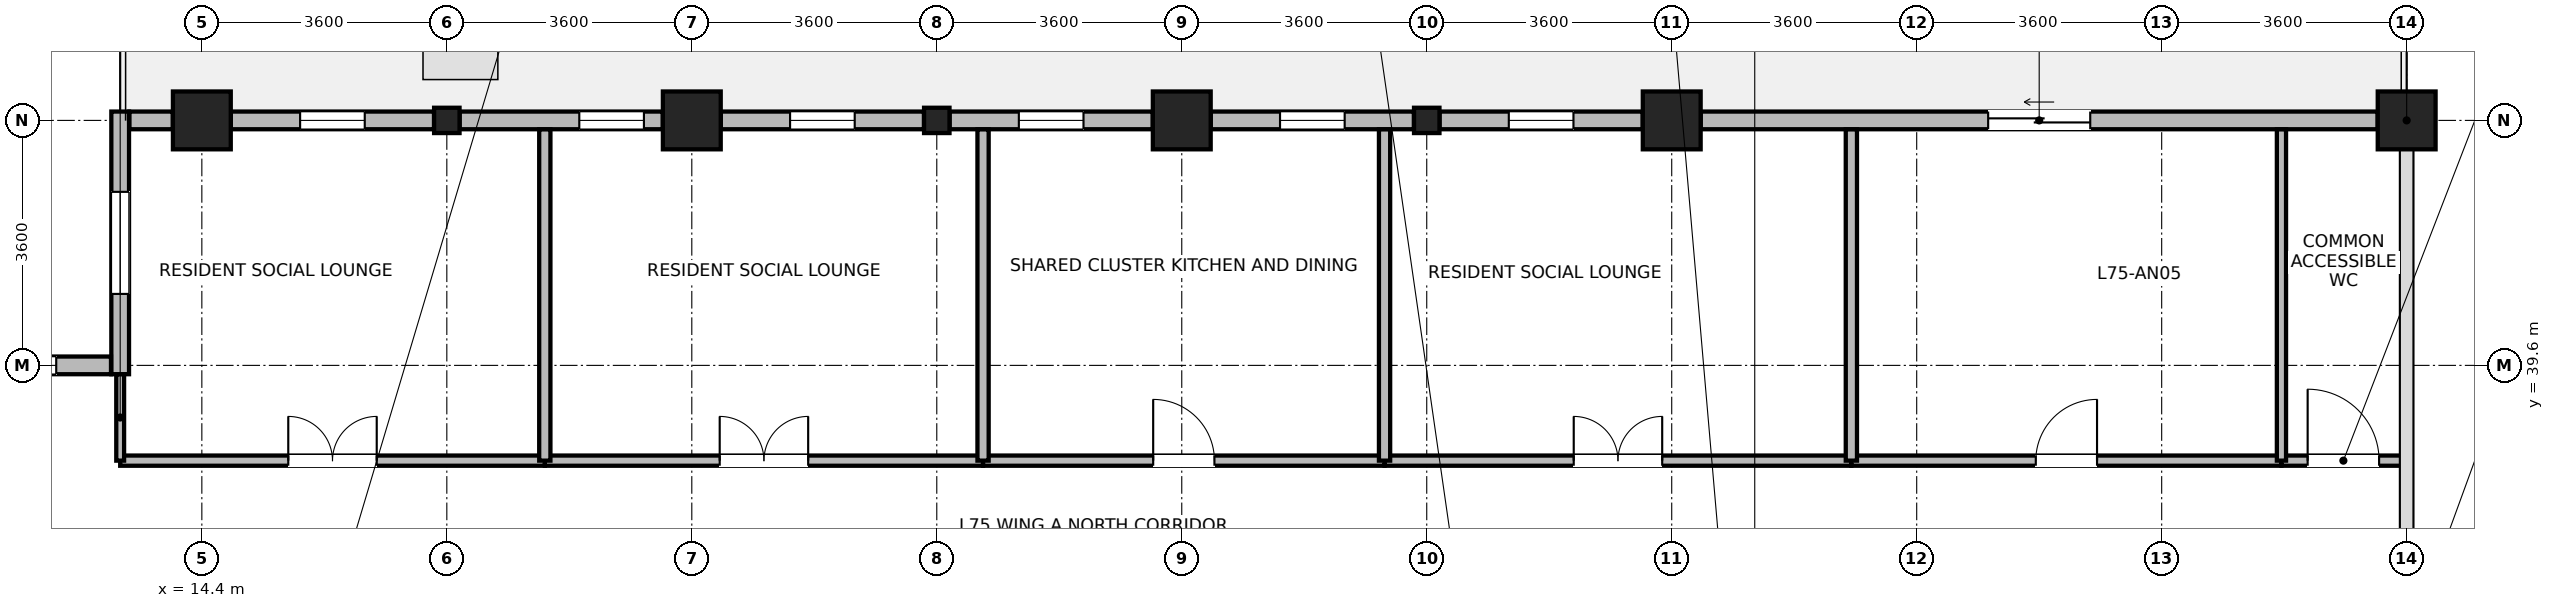
"""IFC4 building model, lengths in metres.
Left out: names, types, materials, properties, quantities, classifications, styles, units other than length and angle.
Written with IfcOpenShell. Run it as: python <this file> out.ifc"""

import sys

from ifc_helpers import new_model, si_unit, direction, frame, frame_2d, origin, origin_2d, place, context, subcontext, project, spatial, rectangle, i_section, extrude, source, transform, mapped, element, fill, save


model = new_model("IFC4")
c1 = context("Model", 3, precision=1e-05, world=origin(), true_north=direction((0.0, 1.0)))
c2 = subcontext(c1, "Body", "Model", "MODEL_VIEW")
j1 = project(units=[si_unit("LENGTHUNIT", "METRE"), si_unit("PLANEANGLEUNIT", "RADIAN")], contexts=[c1])
p1 = place(None, origin())
s1 = spatial("IfcSite", under=j1, at=p1, CompositionType="ELEMENT")
p2 = place(p1, origin())
s2 = spatial("IfcBuilding", under=s1, at=p2, CompositionType="ELEMENT")
p3 = place(p2, frame((0.0, 0.0, 290.6)))
s3 = spatial("IfcBuildingStorey", under=s2, at=p3, CompositionType="ELEMENT", Elevation=290.6)
m1 = source(origin(), c2, "Body", "SweptSolid", [
    extrude(rectangle(XDim=0.85, YDim=0.85, at=origin_2d()), origin(), (0.0, 0.0, 1.0), 3.7),
])
for number, where, z_axis, x_axis in (
    (1, (14.4, 43.2, 0.0), (0.0, 0.0, 1.0), (1.0, 0.0, 0.0)),
    (2, (21.6, 43.2, 0.0), (0.0, 0.0, 1.0), (1.0, 0.0, 0.0)),
    (3, (28.8, 43.2, 0.0), (0.0, 0.0, 1.0), (1.0, 0.0, 0.0)),
    (4, (36.0, 43.2, 0.0), (0.0, 0.0, 1.0), (1.0, 0.0, 0.0)),
    (5, (46.8, 43.2, 0.0), (0.0, 0.0, 1.0), (1.0, 0.0, 0.0)),
):
    element("IfcColumn", number, at=place(p3, frame(where, z_axis=z_axis, x_axis=x_axis)), inside=s3, PredefinedType="COLUMN", context=c2, shape_type="MappedRepresentation", body=[
        mapped(m1, transform((0.0, 0.0, 0.0), x_axis=(1.0, 0.0, 0.0), y_axis=(0.0, 1.0, 0.0), z_axis=(0.0, 0.0, 1.0), scale=1.0)),
    ])
m2 = source(origin(), c2, "Body", "SweptSolid", [
    extrude(i_section(OverallWidth=0.374, OverallDepth=0.372, WebThickness=0.015, FlangeThickness=0.026, FilletRadius=0.015, at=origin_2d()), origin(), (0.0, 0.0, 1.0), 3.7),
])
for number, where, z_axis, x_axis in (
    (6, (18.0, 43.2, 0.0), (0.0, 0.0, 1.0), (1.0, 0.0, 0.0)),
    (7, (25.2, 43.2, 0.0), (0.0, 0.0, 1.0), (1.0, 0.0, 0.0)),
    (8, (32.4, 43.2, 0.0), (0.0, 0.0, 1.0), (1.0, 0.0, 0.0)),
):
    element("IfcColumn", number, at=place(p3, frame(where, z_axis=z_axis, x_axis=x_axis)), inside=s3, PredefinedType="COLUMN", context=c2, shape_type="MappedRepresentation", body=[
        mapped(m2, transform((0.0, 0.0, 0.0), x_axis=(1.0, 0.0, 0.0), y_axis=(0.0, 1.0, 0.0), z_axis=(0.0, 0.0, 1.0), scale=1.0)),
    ])
p4 = place(p3, frame((36.426, 43.2, 0.0), z_axis=(0.0, 0.0, 1.0), x_axis=(1.0, 0.0, 0.0)))
e9 = element("IfcWall", 9, at=p4, inside=s3, PredefinedType="STANDARD", context=c2, shape_type="SweptSolid", body=[
    extrude(rectangle(XDim=9.948, YDim=0.26, at=frame_2d((4.974, 0.0))), origin(), (0.0, 0.0, 1.0), 3.055),
])
p5 = place(p4, frame((4.224, 0.0, 0.0)))
e10 = element("IfcOpeningElement", 10, at=p5, cuts=e9, PredefinedType="OPENING", context=c2, shape_type="SweptSolid", body=[
    extrude(rectangle(XDim=1.5, YDim=2.15, at=frame_2d((0.75, 1.075))), frame((0.0, 0.14, 0.0), z_axis=(0.0, -1.0, 0.0), x_axis=(1.0, 0.0, 0.0)), (0.0, 0.0, 1.0), 0.28),
])
p6 = place(p3, frame((32.588, 43.2, 0.0), z_axis=(0.0, 0.0, 1.0), x_axis=(1.0, 0.0, 0.0)))
e11 = element("IfcWall", 11, at=p6, inside=s3, PredefinedType="STANDARD", context=c2, shape_type="SweptSolid", body=[
    extrude(rectangle(XDim=2.986, YDim=0.26, at=frame_2d((1.493, 0.0))), origin(), (0.0, 0.0, 1.0), 3.055),
])
p7 = place(p6, frame((1.018, 0.0, 0.85)))
e12 = element("IfcOpeningElement", 12, at=p7, cuts=e11, PredefinedType="OPENING", context=c2, shape_type="SweptSolid", body=[
    extrude(rectangle(XDim=0.95, YDim=1.75, at=frame_2d((0.475, 0.875))), frame((0.0, 0.14, 0.0), z_axis=(0.0, -1.0, 0.0), x_axis=(1.0, 0.0, 0.0)), (0.0, 0.0, 1.0), 0.28),
])
p8 = place(p3, frame((29.226, 43.2, 0.0), z_axis=(0.0, 0.0, 1.0), x_axis=(1.0, 0.0, 0.0)))
e13 = element("IfcWall", 13, at=p8, inside=s3, PredefinedType="STANDARD", context=c2, shape_type="SweptSolid", body=[
    extrude(rectangle(XDim=2.986, YDim=0.26, at=frame_2d((1.493, 0.0))), origin(), (0.0, 0.0, 1.0), 3.055),
])
p9 = place(p8, frame((1.018, 0.0, 0.85)))
e14 = element("IfcOpeningElement", 14, at=p9, cuts=e13, PredefinedType="OPENING", context=c2, shape_type="SweptSolid", body=[
    extrude(rectangle(XDim=0.95, YDim=1.75, at=frame_2d((0.475, 0.875))), frame((0.0, 0.14, 0.0), z_axis=(0.0, -1.0, 0.0), x_axis=(1.0, 0.0, 0.0)), (0.0, 0.0, 1.0), 0.28),
])
p10 = place(p3, frame((25.388, 43.2, 0.0), z_axis=(0.0, 0.0, 1.0), x_axis=(1.0, 0.0, 0.0)))
e15 = element("IfcWall", 15, at=p10, inside=s3, PredefinedType="STANDARD", context=c2, shape_type="SweptSolid", body=[
    extrude(rectangle(XDim=2.986, YDim=0.26, at=frame_2d((1.493, 0.0))), origin(), (0.0, 0.0, 1.0), 3.055),
])
p11 = place(p10, frame((1.018, 0.0, 0.85)))
e16 = element("IfcOpeningElement", 16, at=p11, cuts=e15, PredefinedType="OPENING", context=c2, shape_type="SweptSolid", body=[
    extrude(rectangle(XDim=0.95, YDim=1.75, at=frame_2d((0.475, 0.875))), frame((0.0, 0.14, 0.0), z_axis=(0.0, -1.0, 0.0), x_axis=(1.0, 0.0, 0.0)), (0.0, 0.0, 1.0), 0.28),
])
p12 = place(p3, frame((22.026, 43.2, 0.0), z_axis=(0.0, 0.0, 1.0), x_axis=(1.0, 0.0, 0.0)))
e17 = element("IfcWall", 17, at=p12, inside=s3, PredefinedType="STANDARD", context=c2, shape_type="SweptSolid", body=[
    extrude(rectangle(XDim=2.986, YDim=0.26, at=frame_2d((1.493, 0.0))), origin(), (0.0, 0.0, 1.0), 3.055),
])
p13 = place(p12, frame((1.018, 0.0, 0.85)))
e18 = element("IfcOpeningElement", 18, at=p13, cuts=e17, PredefinedType="OPENING", context=c2, shape_type="SweptSolid", body=[
    extrude(rectangle(XDim=0.95, YDim=1.75, at=frame_2d((0.475, 0.875))), frame((0.0, 0.14, 0.0), z_axis=(0.0, -1.0, 0.0), x_axis=(1.0, 0.0, 0.0)), (0.0, 0.0, 1.0), 0.28),
])
p14 = place(p3, frame((18.188, 43.2, 0.0), z_axis=(0.0, 0.0, 1.0), x_axis=(1.0, 0.0, 0.0)))
e19 = element("IfcWall", 19, at=p14, inside=s3, PredefinedType="STANDARD", context=c2, shape_type="SweptSolid", body=[
    extrude(rectangle(XDim=2.986, YDim=0.26, at=frame_2d((1.493, 0.0))), origin(), (0.0, 0.0, 1.0), 3.055),
])
p15 = place(p14, frame((1.759, 0.0, 0.85)))
e20 = element("IfcOpeningElement", 20, at=p15, cuts=e19, PredefinedType="OPENING", context=c2, shape_type="SweptSolid", body=[
    extrude(rectangle(XDim=0.95, YDim=1.75, at=frame_2d((0.475, 0.875))), frame((0.0, 0.14, 0.0), z_axis=(0.0, -1.0, 0.0), x_axis=(1.0, 0.0, 0.0)), (0.0, 0.0, 1.0), 0.28),
])
p16 = place(p3, frame((14.826, 43.2, 0.0), z_axis=(0.0, 0.0, 1.0), x_axis=(1.0, 0.0, 0.0)))
e21 = element("IfcWall", 21, at=p16, inside=s3, PredefinedType="STANDARD", context=c2, shape_type="SweptSolid", body=[
    extrude(rectangle(XDim=2.986, YDim=0.26, at=frame_2d((1.493, 0.0))), origin(), (0.0, 0.0, 1.0), 3.055),
])
p17 = place(p16, frame((1.018, 0.0, 0.85)))
e22 = element("IfcOpeningElement", 22, at=p17, cuts=e21, PredefinedType="OPENING", context=c2, shape_type="SweptSolid", body=[
    extrude(rectangle(XDim=0.95, YDim=1.75, at=frame_2d((0.475, 0.875))), frame((0.0, 0.14, 0.0), z_axis=(0.0, -1.0, 0.0), x_axis=(1.0, 0.0, 0.0)), (0.0, 0.0, 1.0), 0.28),
])
p18 = place(p3, frame((13.335, 43.2, 0.0), z_axis=(0.0, 0.0, 1.0), x_axis=(1.0, 0.0, 0.0)))
e23 = element("IfcWall", 23, at=p18, inside=s3, PredefinedType="STANDARD", context=c2, shape_type="SweptSolid", body=[
    extrude(rectangle(XDim=0.639, YDim=0.26, at=frame_2d((0.32, 0.0))), origin(), (0.0, 0.0, 1.0), 3.455),
])
p19 = place(p3, frame((13.2, 39.47, 0.0), z_axis=(0.0, 0.0, 1.0), x_axis=(0.0, 1.0, 0.0)))
e24 = element("IfcWall", 24, at=p19, inside=s3, PredefinedType="STANDARD", context=c2, shape_type="SweptSolid", body=[
    extrude(rectangle(XDim=3.86, YDim=0.26, at=frame_2d((1.93, 0.0))), origin(), (0.0, 0.0, 1.0), 3.455),
])
p20 = place(p19, frame((1.18, 0.0, 0.85)))
e25 = element("IfcOpeningElement", 25, at=p20, cuts=e24, PredefinedType="OPENING", context=c2, shape_type="SweptSolid", body=[
    extrude(rectangle(XDim=1.5, YDim=1.85, at=frame_2d((0.75, 0.925))), frame((0.0, 0.14, 0.0), z_axis=(0.0, -1.0, 0.0), x_axis=(1.0, 0.0, 0.0)), (0.0, 0.0, 1.0), 0.28),
])
p21 = place(p3, frame((3.735, 39.6, 0.0), z_axis=(0.0, 0.0, 1.0), x_axis=(1.0, 0.0, 0.0)))
e26 = element("IfcWall", 26, at=p21, inside=s3, PredefinedType="STANDARD", context=c2, shape_type="SweptSolid", body=[
    extrude(rectangle(XDim=9.33, YDim=0.26, at=frame_2d((4.665, 0.0))), origin(), (0.0, 0.0, 1.0), 3.455),
])
p22 = place(p21, frame((0.805, 0.0, 0.85)))
e27 = element("IfcOpeningElement", 27, at=p22, cuts=e26, PredefinedType="OPENING", context=c2, shape_type="SweptSolid", body=[
    extrude(rectangle(XDim=1.5, YDim=1.85, at=frame_2d((0.75, 0.925))), frame((0.0, 0.14, 0.0), z_axis=(0.0, -1.0, 0.0), x_axis=(1.0, 0.0, 0.0)), (0.0, 0.0, 1.0), 0.28),
])
p23 = place(p21, frame((3.915, 0.0, 0.85)))
e28 = element("IfcOpeningElement", 28, at=p23, cuts=e26, PredefinedType="OPENING", context=c2, shape_type="SweptSolid", body=[
    extrude(rectangle(XDim=1.5, YDim=1.85, at=frame_2d((0.75, 0.925))), frame((0.0, 0.14, 0.0), z_axis=(0.0, -1.0, 0.0), x_axis=(1.0, 0.0, 0.0)), (0.0, 0.0, 1.0), 0.28),
])
p24 = place(p21, frame((7.025, 0.0, 0.85)))
e29 = element("IfcOpeningElement", 29, at=p24, cuts=e26, PredefinedType="OPENING", context=c2, shape_type="SweptSolid", body=[
    extrude(rectangle(XDim=1.5, YDim=1.85, at=frame_2d((0.75, 0.925))), frame((0.0, 0.14, 0.0), z_axis=(0.0, -1.0, 0.0), x_axis=(1.0, 0.0, 0.0)), (0.0, 0.0, 1.0), 0.28),
])
p25 = place(p3, frame((31.78, 38.2, 0.0), z_axis=(0.0, 0.0, 1.0), x_axis=(1.0, 0.0, 0.0)))
e30 = element("IfcWall", 30, at=p25, inside=s3, PredefinedType="PARTITIONING", context=c2, shape_type="SweptSolid", body=[
    extrude(rectangle(XDim=6.86, YDim=0.15, at=frame_2d((3.43, 0.0))), origin(), (0.0, 0.0, 1.0), 3.455),
])
p26 = place(p25, frame((2.78, 0.0, 0.0)))
e31 = element("IfcOpeningElement", 31, at=p26, cuts=e30, PredefinedType="OPENING", context=c2, shape_type="SweptSolid", body=[
    extrude(rectangle(XDim=1.3, YDim=2.12, at=frame_2d((0.65, 1.06))), frame((0.0, 0.085, 0.0), z_axis=(0.0, -1.0, 0.0), x_axis=(1.0, 0.0, 0.0)), (0.0, 0.0, 1.0), 0.17),
])
p27 = place(p3, frame((19.44, 38.2, 0.0), z_axis=(0.0, 0.0, 1.0), x_axis=(1.0, 0.0, 0.0)))
e32 = element("IfcWall", 32, at=p27, inside=s3, PredefinedType="PARTITIONING", context=c2, shape_type="SweptSolid", body=[
    extrude(rectangle(XDim=6.44, YDim=0.15, at=frame_2d((3.22, 0.0))), origin(), (0.0, 0.0, 1.0), 3.455),
])
p28 = place(p27, frame((2.57, 0.0, 0.0)))
e33 = element("IfcOpeningElement", 33, at=p28, cuts=e32, PredefinedType="OPENING", context=c2, shape_type="SweptSolid", body=[
    extrude(rectangle(XDim=1.3, YDim=2.12, at=frame_2d((0.65, 1.06))), frame((0.0, 0.085, 0.0), z_axis=(0.0, -1.0, 0.0), x_axis=(1.0, 0.0, 0.0)), (0.0, 0.0, 1.0), 0.17),
])
p29 = place(p3, frame((38.64, 38.2, 0.0), z_axis=(0.0, 0.0, 1.0), x_axis=(1.0, 0.0, 0.0)))
e34 = element("IfcWall", 34, at=p29, inside=s3, PredefinedType="PARTITIONING", context=c2, shape_type="SweptSolid", body=[
    extrude(rectangle(XDim=6.32, YDim=0.15, at=frame_2d((3.16, 0.0))), origin(), (0.0, 0.0, 1.0), 3.455),
])
p30 = place(p29, frame((2.71, 0.0, 0.0)))
e35 = element("IfcOpeningElement", 35, at=p30, cuts=e34, PredefinedType="OPENING", context=c2, shape_type="SweptSolid", body=[
    extrude(rectangle(XDim=0.9, YDim=2.08, at=frame_2d((0.45, 1.04))), frame((0.0, 0.085, 0.0), z_axis=(0.0, -1.0, 0.0), x_axis=(1.0, 0.0, 0.0)), (0.0, 0.0, 1.0), 0.17),
])
p31 = place(p3, frame((13.2, 38.2, 0.0), z_axis=(0.0, 0.0, 1.0), x_axis=(1.0, 0.0, 0.0)))
e36 = element("IfcWall", 36, at=p31, inside=s3, PredefinedType="PARTITIONING", context=c2, shape_type="SweptSolid", body=[
    extrude(rectangle(XDim=6.24, YDim=0.15, at=frame_2d((3.12, 0.0))), origin(), (0.0, 0.0, 1.0), 3.455),
])
p32 = place(p31, frame((2.47, 0.0, 0.0)))
e37 = element("IfcOpeningElement", 37, at=p32, cuts=e36, PredefinedType="OPENING", context=c2, shape_type="SweptSolid", body=[
    extrude(rectangle(XDim=1.3, YDim=2.12, at=frame_2d((0.65, 1.06))), frame((0.0, 0.085, 0.0), z_axis=(0.0, -1.0, 0.0), x_axis=(1.0, 0.0, 0.0)), (0.0, 0.0, 1.0), 0.17),
])
p33 = place(p3, frame((25.88, 38.2, 0.0), z_axis=(0.0, 0.0, 1.0), x_axis=(1.0, 0.0, 0.0)))
e38 = element("IfcWall", 38, at=p33, inside=s3, PredefinedType="PARTITIONING", context=c2, shape_type="SweptSolid", body=[
    extrude(rectangle(XDim=5.9, YDim=0.15, at=frame_2d((2.95, 0.0))), origin(), (0.0, 0.0, 1.0), 3.455),
])
p34 = place(p33, frame((2.5, 0.0, 0.0)))
e39 = element("IfcOpeningElement", 39, at=p34, cuts=e38, PredefinedType="OPENING", context=c2, shape_type="SweptSolid", body=[
    extrude(rectangle(XDim=0.9, YDim=2.08, at=frame_2d((0.45, 1.04))), frame((0.0, 0.085, 0.0), z_axis=(0.0, -1.0, 0.0), x_axis=(1.0, 0.0, 0.0)), (0.0, 0.0, 1.0), 0.17),
])
p35 = place(p3, frame((44.96, 38.2, 0.0), z_axis=(0.0, 0.0, 1.0), x_axis=(1.0, 0.0, 0.0)))
e40 = element("IfcWall", 40, at=p35, inside=s3, PredefinedType="PARTITIONING", context=c2, shape_type="SweptSolid", body=[
    extrude(rectangle(XDim=1.82, YDim=0.15, at=frame_2d((0.91, 0.0))), origin(), (0.0, 0.0, 1.0), 3.455),
])
p36 = place(p35, frame((0.385, 0.0, 0.0)))
e41 = element("IfcOpeningElement", 41, at=p36, cuts=e40, PredefinedType="OPENING", context=c2, shape_type="SweptSolid", body=[
    extrude(rectangle(XDim=1.05, YDim=2.12, at=frame_2d((0.525, 1.06))), frame((0.0, 0.085, 0.0), z_axis=(0.0, -1.0, 0.0), x_axis=(1.0, 0.0, 0.0)), (0.0, 0.0, 1.0), 0.17),
])
p37 = place(p3, frame((13.2, 38.2, 0.0), z_axis=(0.0, 0.0, 1.0), x_axis=(0.0, 1.0, 0.0)))
e42 = element("IfcWall", 42, at=p37, inside=s3, PredefinedType="PARTITIONING", context=c2, shape_type="SweptSolid", body=[
    extrude(rectangle(XDim=1.268, YDim=0.115, at=frame_2d((0.634, 0.0))), origin(), (0.0, 0.0, 1.0), 3.455),
])
for number, where, z_axis, x_axis in (
    (43, (19.44, 38.2, 0.0), (0.0, 0.0, 1.0), (0.0, 1.0, 0.0)),
    (44, (25.88, 38.2, 0.0), (0.0, 0.0, 1.0), (0.0, 1.0, 0.0)),
    (45, (31.78, 38.2, 0.0), (0.0, 0.0, 1.0), (0.0, 1.0, 0.0)),
    (46, (38.64, 38.2, 0.0), (0.0, 0.0, 1.0), (0.0, 1.0, 0.0)),
):
    element("IfcWall", number, at=place(p3, frame(where, z_axis=z_axis, x_axis=x_axis)), inside=s3, PredefinedType="PARTITIONING", context=c2, shape_type="SweptSolid", body=[
        extrude(rectangle(XDim=4.868, YDim=0.165, at=frame_2d((2.434, 0.0))), origin(), (0.0, 0.0, 1.0), 3.455),
    ])
p38 = place(p3, frame((44.96, 38.2, 0.0), z_axis=(0.0, 0.0, 1.0), x_axis=(0.0, 1.0, 0.0)))
e47 = element("IfcWall", 47, at=p38, inside=s3, PredefinedType="PARTITIONING", context=c2, shape_type="SweptSolid", body=[
    extrude(rectangle(XDim=4.868, YDim=0.135, at=frame_2d((2.434, 0.0))), origin(), (0.0, 0.0, 1.0), 3.455),
])
p39 = place(p5, origin())
e48 = element("IfcDoor", 48, at=p39, inside=s3, OperationType="SLIDING_TO_LEFT", PredefinedType="DOOR", context=c2, shape_type="SweptSolid", body=[
    extrude(rectangle(XDim=1.5, YDim=2.15, at=frame_2d((0.75, 1.075))), frame((0.0, 0.025, 0.0), z_axis=(0.0, -1.0, 0.0), x_axis=(1.0, 0.0, 0.0)), (0.0, 0.0, 1.0), 0.05),
])
fill(e10, e48)
p40 = place(p7, origin())
e49 = element("IfcWindow", 49, at=p40, inside=s3, PartitioningType="SINGLE_PANEL", PredefinedType="WINDOW", context=c2, shape_type="SweptSolid", body=[
    extrude(rectangle(XDim=0.95, YDim=1.75, at=frame_2d((0.475, 0.875))), frame((0.0, 0.03, 0.0), z_axis=(0.0, -1.0, 0.0), x_axis=(1.0, 0.0, 0.0)), (0.0, 0.0, 1.0), 0.06),
])
fill(e12, e49)
p41 = place(p9, origin())
e50 = element("IfcWindow", 50, at=p41, inside=s3, PartitioningType="SINGLE_PANEL", PredefinedType="WINDOW", context=c2, shape_type="SweptSolid", body=[
    extrude(rectangle(XDim=0.95, YDim=1.75, at=frame_2d((0.475, 0.875))), frame((0.0, 0.03, 0.0), z_axis=(0.0, -1.0, 0.0), x_axis=(1.0, 0.0, 0.0)), (0.0, 0.0, 1.0), 0.06),
])
fill(e14, e50)
p42 = place(p11, origin())
e51 = element("IfcWindow", 51, at=p42, inside=s3, PartitioningType="SINGLE_PANEL", PredefinedType="WINDOW", context=c2, shape_type="SweptSolid", body=[
    extrude(rectangle(XDim=0.95, YDim=1.75, at=frame_2d((0.475, 0.875))), frame((0.0, 0.03, 0.0), z_axis=(0.0, -1.0, 0.0), x_axis=(1.0, 0.0, 0.0)), (0.0, 0.0, 1.0), 0.06),
])
fill(e16, e51)
p43 = place(p13, origin())
e52 = element("IfcWindow", 52, at=p43, inside=s3, PartitioningType="SINGLE_PANEL", PredefinedType="WINDOW", context=c2, shape_type="SweptSolid", body=[
    extrude(rectangle(XDim=0.95, YDim=1.75, at=frame_2d((0.475, 0.875))), frame((0.0, 0.03, 0.0), z_axis=(0.0, -1.0, 0.0), x_axis=(1.0, 0.0, 0.0)), (0.0, 0.0, 1.0), 0.06),
])
fill(e18, e52)
p44 = place(p15, origin())
e53 = element("IfcWindow", 53, at=p44, inside=s3, PartitioningType="SINGLE_PANEL", PredefinedType="WINDOW", context=c2, shape_type="SweptSolid", body=[
    extrude(rectangle(XDim=0.95, YDim=1.75, at=frame_2d((0.475, 0.875))), frame((0.0, 0.03, 0.0), z_axis=(0.0, -1.0, 0.0), x_axis=(1.0, 0.0, 0.0)), (0.0, 0.0, 1.0), 0.06),
])
fill(e20, e53)
p45 = place(p17, origin())
e54 = element("IfcWindow", 54, at=p45, inside=s3, PartitioningType="SINGLE_PANEL", PredefinedType="WINDOW", context=c2, shape_type="SweptSolid", body=[
    extrude(rectangle(XDim=0.95, YDim=1.75, at=frame_2d((0.475, 0.875))), frame((0.0, 0.03, 0.0), z_axis=(0.0, -1.0, 0.0), x_axis=(1.0, 0.0, 0.0)), (0.0, 0.0, 1.0), 0.06),
])
fill(e22, e54)
p46 = place(p20, origin())
e55 = element("IfcWindow", 55, at=p46, inside=s3, PartitioningType="SINGLE_PANEL", PredefinedType="WINDOW", context=c2, shape_type="SweptSolid", body=[
    extrude(rectangle(XDim=1.5, YDim=1.85, at=frame_2d((0.75, 0.925))), frame((0.0, 0.03, 0.0), z_axis=(0.0, -1.0, 0.0), x_axis=(1.0, 0.0, 0.0)), (0.0, 0.0, 1.0), 0.06),
])
fill(e25, e55)
p47 = place(p24, origin())
e56 = element("IfcWindow", 56, at=p47, inside=s3, PartitioningType="SINGLE_PANEL", PredefinedType="WINDOW", context=c2, shape_type="SweptSolid", body=[
    extrude(rectangle(XDim=1.5, YDim=1.85, at=frame_2d((0.75, 0.925))), frame((0.0, 0.03, 0.0), z_axis=(0.0, -1.0, 0.0), x_axis=(1.0, 0.0, 0.0)), (0.0, 0.0, 1.0), 0.06),
])
fill(e29, e56)
p48 = place(p26, origin())
e57 = element("IfcDoor", 57, at=p48, inside=s3, OperationType="DOUBLE_DOOR_SINGLE_SWING", PredefinedType="DOOR", context=c2, shape_type="SweptSolid", body=[
    extrude(rectangle(XDim=1.3, YDim=2.12, at=frame_2d((0.65, 1.06))), frame((0.0, 0.025, 0.0), z_axis=(0.0, -1.0, 0.0), x_axis=(1.0, 0.0, 0.0)), (0.0, 0.0, 1.0), 0.05),
])
fill(e31, e57)
p49 = place(p28, origin())
e58 = element("IfcDoor", 58, at=p49, inside=s3, OperationType="DOUBLE_DOOR_SINGLE_SWING", PredefinedType="DOOR", context=c2, shape_type="SweptSolid", body=[
    extrude(rectangle(XDim=1.3, YDim=2.12, at=frame_2d((0.65, 1.06))), frame((0.0, 0.025, 0.0), z_axis=(0.0, -1.0, 0.0), x_axis=(1.0, 0.0, 0.0)), (0.0, 0.0, 1.0), 0.05),
])
fill(e33, e58)
p50 = place(p30, origin())
e59 = element("IfcDoor", 59, at=p50, inside=s3, OperationType="SINGLE_SWING_RIGHT", PredefinedType="DOOR", context=c2, shape_type="SweptSolid", body=[
    extrude(rectangle(XDim=0.9, YDim=2.08, at=frame_2d((0.45, 1.04))), frame((0.0, 0.025, 0.0), z_axis=(0.0, -1.0, 0.0), x_axis=(1.0, 0.0, 0.0)), (0.0, 0.0, 1.0), 0.05),
])
fill(e35, e59)
p51 = place(p32, origin())
e60 = element("IfcDoor", 60, at=p51, inside=s3, OperationType="DOUBLE_DOOR_SINGLE_SWING", PredefinedType="DOOR", context=c2, shape_type="SweptSolid", body=[
    extrude(rectangle(XDim=1.3, YDim=2.12, at=frame_2d((0.65, 1.06))), frame((0.0, 0.025, 0.0), z_axis=(0.0, -1.0, 0.0), x_axis=(1.0, 0.0, 0.0)), (0.0, 0.0, 1.0), 0.05),
])
fill(e37, e60)
p52 = place(p34, origin())
e61 = element("IfcDoor", 61, at=p52, inside=s3, OperationType="SINGLE_SWING_LEFT", PredefinedType="DOOR", context=c2, shape_type="SweptSolid", body=[
    extrude(rectangle(XDim=0.9, YDim=2.08, at=frame_2d((0.45, 1.04))), frame((0.0, 0.025, 0.0), z_axis=(0.0, -1.0, 0.0), x_axis=(1.0, 0.0, 0.0)), (0.0, 0.0, 1.0), 0.05),
])
fill(e39, e61)
p53 = place(p36, origin())
e62 = element("IfcDoor", 62, at=p53, inside=s3, OperationType="SINGLE_SWING_LEFT", PredefinedType="DOOR", context=c2, shape_type="SweptSolid", body=[
    extrude(rectangle(XDim=1.05, YDim=2.12, at=frame_2d((0.525, 1.06))), frame((0.0, 0.025, 0.0), z_axis=(0.0, -1.0, 0.0), x_axis=(1.0, 0.0, 0.0)), (0.0, 0.0, 1.0), 0.05),
])
fill(e41, e62)
save(model, sys.argv[1])
